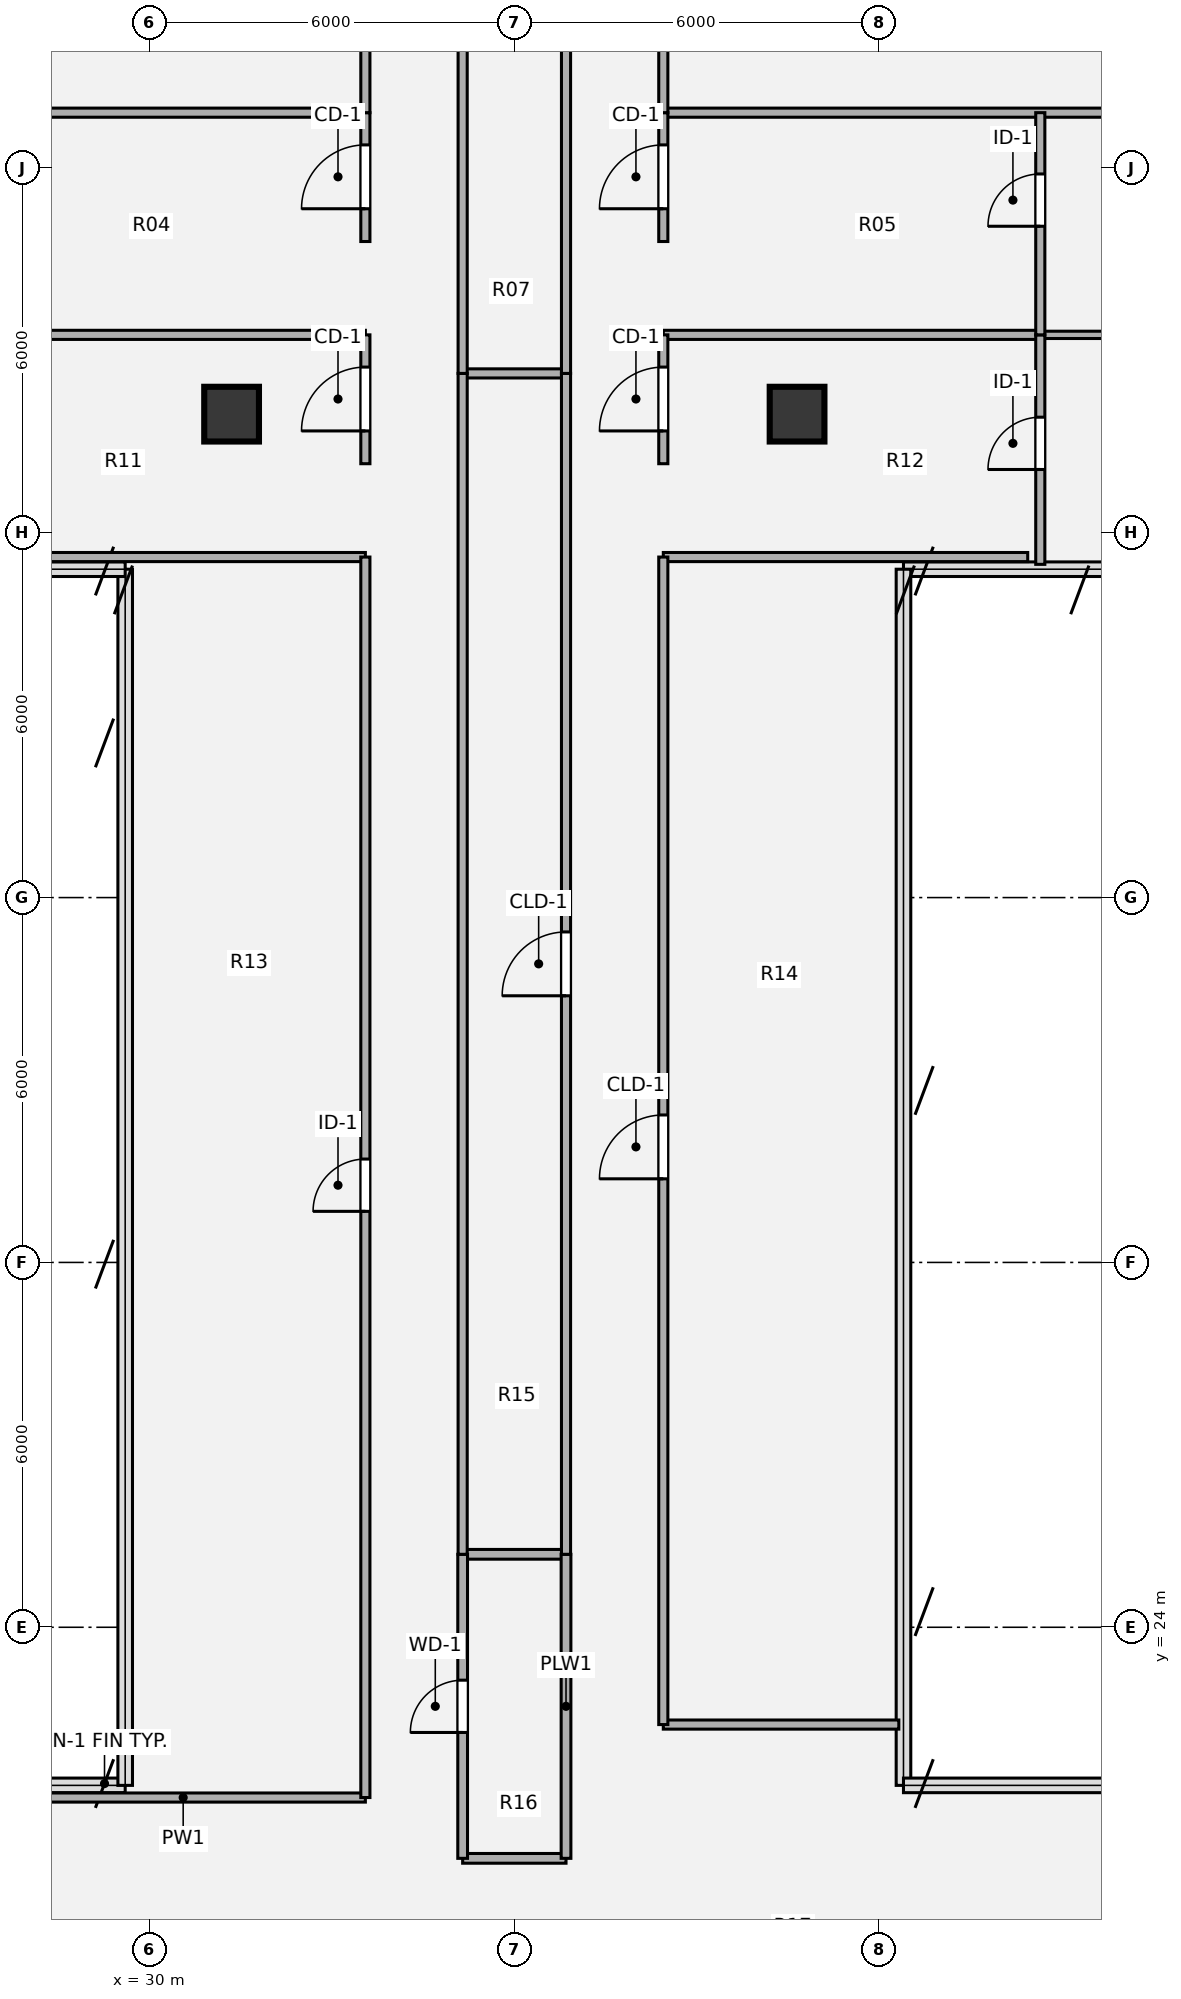
"""IFC4 building model, lengths in metres.
Left out: names, types, materials, properties, quantities, classifications, styles, units other than length and angle.
Written with IfcOpenShell. Run it as: python <this file> out.ifc"""

import sys

from ifc_helpers import new_model, si_unit, direction, frame, frame_2d, origin, origin_2d, place, context, subcontext, project, spatial, rectangle, hollow_circle, extrude, source, transform, mapped, element, fill, save


model = new_model("IFC4")
c1 = context("Model", 3, precision=1e-05, world=origin(), true_north=direction((0.0, 1.0)))
c2 = subcontext(c1, "Body", "Model", "MODEL_VIEW")
j1 = project(units=[si_unit("LENGTHUNIT", "METRE"), si_unit("PLANEANGLEUNIT", "RADIAN")], contexts=[c1])
p1 = place(None, origin())
s1 = spatial("IfcSite", under=j1, at=p1, CompositionType="ELEMENT")
p2 = place(p1, origin())
s2 = spatial("IfcBuilding", under=s1, at=p2, CompositionType="ELEMENT")
p3 = place(p2, frame((0.0, 0.0, 241.92)))
s3 = spatial("IfcBuildingStorey", under=s2, at=p3, CompositionType="ELEMENT", Elevation=241.92)
m1 = source(origin(), c2, "Body", "SweptSolid", [
    extrude(hollow_circle(Radius=0.45, WallThickness=0.032, at=origin_2d()), origin(), (0.0, 0.0, 1.0), 3.78),
])
for number, where, z_axis, x_axis in (
    (1, (31.35, 43.95, 0.0), (0.0, 0.0, 1.0), (1.0, 0.0, 0.0)),
    (2, (40.65, 43.95, 0.0), (0.0, 0.0, 1.0), (1.0, 0.0, 0.0)),
):
    element("IfcColumn", number, at=place(p3, frame(where, z_axis=z_axis, x_axis=x_axis)), inside=s3, PredefinedType="COLUMN", context=c2, shape_type="MappedRepresentation", body=[
        mapped(m1, transform((0.0, 0.0, 0.0), x_axis=(1.0, 0.0, 0.0), y_axis=(0.0, 1.0, 0.0), z_axis=(0.0, 0.0, 1.0), scale=1.0)),
    ])
p4 = place(p3, frame((35.15, 20.2, 0.0), z_axis=(0.0, 0.0, 1.0), x_axis=(1.0, 0.0, 0.0)))
e3 = element("IfcWall", 3, at=p4, inside=s3, PredefinedType="PLUMBINGWALL", context=c2, shape_type="SweptSolid", body=[
    extrude(rectangle(XDim=1.7, YDim=0.16, at=frame_2d((0.85, 0.0))), origin(), (0.0, 0.0, 1.0), 3.5),
])
p5 = place(p3, frame((27.558, 21.2, 0.0), z_axis=(0.0, 0.0, 1.0), x_axis=(1.0, 0.0, 0.0)))
e4 = element("IfcWall", 4, at=p5, inside=s3, PredefinedType="PARTITIONING", context=c2, shape_type="SweptSolid", body=[
    extrude(rectangle(XDim=5.992, YDim=0.15, at=frame_2d((2.996, 0.0))), origin(), (0.0, 0.0, 1.0), 3.5),
])
p6 = place(p3, frame((38.45, 22.4, 0.0), z_axis=(0.0, 0.0, 1.0), x_axis=(1.0, 0.0, 0.0)))
e5 = element("IfcWall", 5, at=p6, inside=s3, PredefinedType="PARTITIONING", context=c2, shape_type="SweptSolid", body=[
    extrude(rectangle(XDim=3.873, YDim=0.15, at=frame_2d((1.937, 0.0))), origin(), (0.0, 0.0, 1.0), 3.5),
])
p7 = place(p3, frame((35.15, 25.2, 0.0), z_axis=(0.0, 0.0, 1.0), x_axis=(1.0, 0.0, 0.0)))
e6 = element("IfcWall", 6, at=p7, inside=s3, PredefinedType="PLUMBINGWALL", context=c2, shape_type="SweptSolid", body=[
    extrude(rectangle(XDim=1.7, YDim=0.16, at=frame_2d((0.85, 0.0))), origin(), (0.0, 0.0, 1.0), 3.5),
])
p8 = place(p3, frame((27.558, 41.6, 0.0), z_axis=(0.0, 0.0, 1.0), x_axis=(1.0, 0.0, 0.0)))
e7 = element("IfcWall", 7, at=p8, inside=s3, PredefinedType="PARTITIONING", context=c2, shape_type="SweptSolid", body=[
    extrude(rectangle(XDim=5.992, YDim=0.15, at=frame_2d((2.996, 0.0))), origin(), (0.0, 0.0, 1.0), 3.5),
])
p9 = place(p3, frame((38.45, 41.6, 0.0), z_axis=(0.0, 0.0, 1.0), x_axis=(1.0, 0.0, 0.0)))
e8 = element("IfcWall", 8, at=p9, inside=s3, PredefinedType="PARTITIONING", context=c2, shape_type="SweptSolid", body=[
    extrude(rectangle(XDim=5.993, YDim=0.15, at=frame_2d((2.997, 0.0))), origin(), (0.0, 0.0, 1.0), 3.5),
])
p10 = place(p3, frame((35.15, 44.62, 0.0), z_axis=(0.0, 0.0, 1.0), x_axis=(1.0, 0.0, 0.0)))
e9 = element("IfcWall", 9, at=p10, inside=s3, PredefinedType="PARTITIONING", context=c2, shape_type="SweptSolid", body=[
    extrude(rectangle(XDim=1.7, YDim=0.15, at=frame_2d((0.85, 0.0))), origin(), (0.0, 0.0, 1.0), 3.259),
])
for number, where, z_axis, x_axis in (
    (10, (27.35, 45.254, 0.0), (0.0, 0.0, 1.0), (1.0, 0.0, 0.0)),
    (11, (38.45, 45.254, 0.0), (0.0, 0.0, 1.0), (1.0, 0.0, 0.0)),
):
    element("IfcWall", number, at=place(p3, frame(where, z_axis=z_axis, x_axis=x_axis)), inside=s3, PredefinedType="PARTITIONING", context=c2, shape_type="SweptSolid", body=[
        extrude(rectangle(XDim=6.2, YDim=0.15, at=frame_2d((3.1, 0.0))), origin(), (0.0, 0.0, 1.0), 2.982),
    ])
p11 = place(p3, frame((44.65, 45.254, 0.0), z_axis=(0.0, 0.0, 1.0), x_axis=(1.0, 0.0, 0.0)))
e12 = element("IfcWall", 12, at=p11, inside=s3, PredefinedType="PARTITIONING", context=c2, shape_type="SweptSolid", body=[
    extrude(rectangle(XDim=9.57, YDim=0.12, at=frame_2d((4.785, 0.0))), origin(), (0.0, 0.0, 1.0), 2.982),
])
for number, where, z_axis, x_axis in (
    (13, (17.78, 48.908, 0.0), (0.0, 0.0, 1.0), (1.0, 0.0, 0.0)),
    (14, (38.45, 48.908, 0.0), (0.0, 0.0, 1.0), (1.0, 0.0, 0.0)),
):
    element("IfcWall", number, at=place(p3, frame(where, z_axis=z_axis, x_axis=x_axis)), inside=s3, PredefinedType="PARTITIONING", context=c2, shape_type="SweptSolid", body=[
        extrude(rectangle(XDim=15.77, YDim=0.15, at=frame_2d((7.885, 0.0))), origin(), (0.0, 0.0, 1.0), 2.982),
    ])
p12 = place(p3, frame((33.55, 21.2, 0.0), z_axis=(0.0, 0.0, 1.0), x_axis=(0.0, 1.0, 0.0)))
e15 = element("IfcWall", 15, at=p12, inside=s3, PredefinedType="PARTITIONING", context=c2, shape_type="SweptSolid", body=[
    extrude(rectangle(XDim=20.4, YDim=0.15, at=frame_2d((10.2, 0.0))), origin(), (0.0, 0.0, 1.0), 3.5),
])
p13 = place(p12, frame((9.64, 0.0, 0.0)))
e16 = element("IfcOpeningElement", 16, at=p13, cuts=e15, PredefinedType="OPENING", context=c2, shape_type="SweptSolid", body=[
    extrude(rectangle(XDim=0.86, YDim=2.1, at=origin_2d()), frame((0.43, 0.085, 1.05), z_axis=(0.0, -1.0, 0.0), x_axis=(1.0, 0.0, 0.0)), (0.0, 0.0, 1.0), 0.17),
])
p14 = place(p3, frame((33.55, 43.135, 0.0), z_axis=(0.0, 0.0, 1.0), x_axis=(0.0, 1.0, 0.0)))
e17 = element("IfcWall", 17, at=p14, inside=s3, PredefinedType="PARTITIONING", context=c2, shape_type="SweptSolid", body=[
    extrude(rectangle(XDim=2.119, YDim=0.15, at=frame_2d((1.06, 0.0))), origin(), (0.0, 0.0, 1.0), 3.5),
])
p15 = place(p14, frame((0.539, 0.0, 0.0)))
e18 = element("IfcOpeningElement", 18, at=p15, cuts=e17, PredefinedType="OPENING", context=c2, shape_type="SweptSolid", body=[
    extrude(rectangle(XDim=1.05, YDim=2.1, at=origin_2d()), frame((0.525, 0.085, 1.05), z_axis=(0.0, -1.0, 0.0), x_axis=(1.0, 0.0, 0.0)), (0.0, 0.0, 1.0), 0.17),
])
p16 = place(p3, frame((33.55, 46.789, 0.0), z_axis=(0.0, 0.0, 1.0), x_axis=(0.0, 1.0, 0.0)))
e19 = element("IfcWall", 19, at=p16, inside=s3, PredefinedType="PARTITIONING", context=c2, shape_type="SweptSolid", body=[
    extrude(rectangle(XDim=2.119, YDim=0.15, at=frame_2d((1.06, 0.0))), origin(), (0.0, 0.0, 1.0), 3.5),
])
p17 = place(p16, frame((0.539, 0.0, 0.0)))
e20 = element("IfcOpeningElement", 20, at=p17, cuts=e19, PredefinedType="OPENING", context=c2, shape_type="SweptSolid", body=[
    extrude(rectangle(XDim=1.05, YDim=2.1, at=origin_2d()), frame((0.525, 0.085, 1.05), z_axis=(0.0, -1.0, 0.0), x_axis=(1.0, 0.0, 0.0)), (0.0, 0.0, 1.0), 0.17),
])
p18 = place(p3, frame((33.55, 48.908, 0.0), z_axis=(0.0, 0.0, 1.0), x_axis=(0.0, 1.0, 0.0)))
e21 = element("IfcWall", 21, at=p18, inside=s3, PredefinedType="PARTITIONING", context=c2, shape_type="SweptSolid", body=[
    extrude(rectangle(XDim=10.092, YDim=0.15, at=frame_2d((5.046, 0.0))), origin(), (0.0, 0.0, 1.0), 3.5),
])
p19 = place(p18, frame((4.521, 0.0, 0.0)))
e22 = element("IfcOpeningElement", 22, at=p19, cuts=e21, PredefinedType="OPENING", context=c2, shape_type="SweptSolid", body=[
    extrude(rectangle(XDim=1.05, YDim=2.1, at=origin_2d()), frame((0.525, 0.085, 1.05), z_axis=(0.0, -1.0, 0.0), x_axis=(1.0, 0.0, 0.0)), (0.0, 0.0, 1.0), 0.17),
])
p20 = place(p3, frame((35.15, 20.2, 0.0), z_axis=(0.0, 0.0, 1.0), x_axis=(0.0, 1.0, 0.0)))
e23 = element("IfcWall", 23, at=p20, inside=s3, PredefinedType="PLUMBINGWALL", context=c2, shape_type="SweptSolid", body=[
    extrude(rectangle(XDim=5.0, YDim=0.16, at=frame_2d((2.5, 0.0))), origin(), (0.0, 0.0, 1.0), 3.5),
])
p21 = place(p20, frame((2.07, 0.0, 0.0)))
e24 = element("IfcOpeningElement", 24, at=p21, cuts=e23, PredefinedType="OPENING", context=c2, shape_type="SweptSolid", body=[
    extrude(rectangle(XDim=0.86, YDim=2.1, at=origin_2d()), frame((0.43, 0.09, 1.05), z_axis=(0.0, -1.0, 0.0), x_axis=(1.0, 0.0, 0.0)), (0.0, 0.0, 1.0), 0.18),
])
p22 = place(p3, frame((35.15, 25.2, 0.0), z_axis=(0.0, 0.0, 1.0), x_axis=(0.0, 1.0, 0.0)))
e25 = element("IfcWall", 25, at=p22, inside=s3, PredefinedType="PARTITIONING", context=c2, shape_type="SweptSolid", body=[
    extrude(rectangle(XDim=19.42, YDim=0.15, at=frame_2d((9.71, 0.0))), origin(), (0.0, 0.0, 1.0), 3.5),
])
p23 = place(p3, frame((35.15, 44.62, 0.0), z_axis=(0.0, 0.0, 1.0), x_axis=(0.0, 1.0, 0.0)))
e26 = element("IfcWall", 26, at=p23, inside=s3, PredefinedType="PARTITIONING", context=c2, shape_type="SweptSolid", body=[
    extrude(rectangle(XDim=12.58, YDim=0.15, at=frame_2d((6.29, 0.0))), origin(), (0.0, 0.0, 1.0), 3.5),
])
p24 = place(p23, frame((5.83, 0.0, 0.0)))
e27 = element("IfcOpeningElement", 27, at=p24, cuts=e26, PredefinedType="OPENING", context=c2, shape_type="SweptSolid", body=[
    extrude(rectangle(XDim=0.86, YDim=2.1, at=origin_2d()), frame((0.43, 0.085, 1.05), z_axis=(0.0, -1.0, 0.0), x_axis=(1.0, 0.0, 0.0)), (0.0, 0.0, 1.0), 0.17),
])
p25 = place(p3, frame((36.85, 20.2, 0.0), z_axis=(0.0, 0.0, 1.0), x_axis=(0.0, 1.0, 0.0)))
e28 = element("IfcWall", 28, at=p25, inside=s3, PredefinedType="PLUMBINGWALL", context=c2, shape_type="SweptSolid", body=[
    extrude(rectangle(XDim=5.0, YDim=0.16, at=frame_2d((2.5, 0.0))), origin(), (0.0, 0.0, 1.0), 3.5),
])
p26 = place(p3, frame((36.85, 25.2, 0.0), z_axis=(0.0, 0.0, 1.0), x_axis=(0.0, 1.0, 0.0)))
e29 = element("IfcWall", 29, at=p26, inside=s3, PredefinedType="PARTITIONING", context=c2, shape_type="SweptSolid", body=[
    extrude(rectangle(XDim=19.42, YDim=0.15, at=frame_2d((9.71, 0.0))), origin(), (0.0, 0.0, 1.0), 3.5),
])
p27 = place(p26, frame((9.185, 0.0, 0.0)))
e30 = element("IfcOpeningElement", 30, at=p27, cuts=e29, PredefinedType="OPENING", context=c2, shape_type="SweptSolid", body=[
    extrude(rectangle(XDim=1.05, YDim=2.1, at=origin_2d()), frame((0.525, 0.085, 1.05), z_axis=(0.0, -1.0, 0.0), x_axis=(1.0, 0.0, 0.0)), (0.0, 0.0, 1.0), 0.17),
])
p28 = place(p3, frame((36.85, 44.62, 0.0), z_axis=(0.0, 0.0, 1.0), x_axis=(0.0, 1.0, 0.0)))
e31 = element("IfcWall", 31, at=p28, inside=s3, PredefinedType="PARTITIONING", context=c2, shape_type="SweptSolid", body=[
    extrude(rectangle(XDim=12.58, YDim=0.15, at=frame_2d((6.29, 0.0))), origin(), (0.0, 0.0, 1.0), 3.5),
])
p29 = place(p3, frame((38.45, 22.4, 0.0), z_axis=(0.0, 0.0, 1.0), x_axis=(0.0, 1.0, 0.0)))
e32 = element("IfcWall", 32, at=p29, inside=s3, PredefinedType="PARTITIONING", context=c2, shape_type="SweptSolid", body=[
    extrude(rectangle(XDim=19.2, YDim=0.15, at=frame_2d((9.6, 0.0))), origin(), (0.0, 0.0, 1.0), 3.5),
])
p30 = place(p29, frame((8.975, 0.0, 0.0)))
e33 = element("IfcOpeningElement", 33, at=p30, cuts=e32, PredefinedType="OPENING", context=c2, shape_type="SweptSolid", body=[
    extrude(rectangle(XDim=1.05, YDim=2.1, at=origin_2d()), frame((0.525, 0.085, 1.05), z_axis=(0.0, -1.0, 0.0), x_axis=(1.0, 0.0, 0.0)), (0.0, 0.0, 1.0), 0.17),
])
p31 = place(p3, frame((38.45, 43.135, 0.0), z_axis=(0.0, 0.0, 1.0), x_axis=(0.0, 1.0, 0.0)))
e34 = element("IfcWall", 34, at=p31, inside=s3, PredefinedType="PARTITIONING", context=c2, shape_type="SweptSolid", body=[
    extrude(rectangle(XDim=2.119, YDim=0.15, at=frame_2d((1.06, 0.0))), origin(), (0.0, 0.0, 1.0), 3.5),
])
p32 = place(p31, frame((0.539, 0.0, 0.0)))
e35 = element("IfcOpeningElement", 35, at=p32, cuts=e34, PredefinedType="OPENING", context=c2, shape_type="SweptSolid", body=[
    extrude(rectangle(XDim=1.05, YDim=2.1, at=origin_2d()), frame((0.525, 0.085, 1.05), z_axis=(0.0, -1.0, 0.0), x_axis=(1.0, 0.0, 0.0)), (0.0, 0.0, 1.0), 0.17),
])
p33 = place(p3, frame((38.45, 46.789, 0.0), z_axis=(0.0, 0.0, 1.0), x_axis=(0.0, 1.0, 0.0)))
e36 = element("IfcWall", 36, at=p33, inside=s3, PredefinedType="PARTITIONING", context=c2, shape_type="SweptSolid", body=[
    extrude(rectangle(XDim=2.119, YDim=0.15, at=frame_2d((1.06, 0.0))), origin(), (0.0, 0.0, 1.0), 3.5),
])
p34 = place(p33, frame((0.539, 0.0, 0.0)))
e37 = element("IfcOpeningElement", 37, at=p34, cuts=e36, PredefinedType="OPENING", context=c2, shape_type="SweptSolid", body=[
    extrude(rectangle(XDim=1.05, YDim=2.1, at=origin_2d()), frame((0.525, 0.085, 1.05), z_axis=(0.0, -1.0, 0.0), x_axis=(1.0, 0.0, 0.0)), (0.0, 0.0, 1.0), 0.17),
])
p35 = place(p3, frame((38.45, 48.908, 0.0), z_axis=(0.0, 0.0, 1.0), x_axis=(0.0, 1.0, 0.0)))
e38 = element("IfcWall", 38, at=p35, inside=s3, PredefinedType="PARTITIONING", context=c2, shape_type="SweptSolid", body=[
    extrude(rectangle(XDim=10.092, YDim=0.15, at=frame_2d((5.046, 0.0))), origin(), (0.0, 0.0, 1.0), 3.5),
])
p36 = place(p35, frame((4.521, 0.0, 0.0)))
e39 = element("IfcOpeningElement", 39, at=p36, cuts=e38, PredefinedType="OPENING", context=c2, shape_type="SweptSolid", body=[
    extrude(rectangle(XDim=1.05, YDim=2.1, at=origin_2d()), frame((0.525, 0.085, 1.05), z_axis=(0.0, -1.0, 0.0), x_axis=(1.0, 0.0, 0.0)), (0.0, 0.0, 1.0), 0.17),
])
p37 = place(p3, frame((44.65, 41.48, 0.0), z_axis=(0.0, 0.0, 1.0), x_axis=(0.0, 1.0, 0.0)))
e40 = element("IfcWall", 40, at=p37, inside=s3, PredefinedType="PARTITIONING", context=c2, shape_type="SweptSolid", body=[
    extrude(rectangle(XDim=3.774, YDim=0.15, at=frame_2d((1.887, 0.0))), origin(), (0.0, 0.0, 1.0), 3.5),
])
p38 = place(p37, frame((1.56, 0.0, 0.0)))
e41 = element("IfcOpeningElement", 41, at=p38, cuts=e40, PredefinedType="OPENING", context=c2, shape_type="SweptSolid", body=[
    extrude(rectangle(XDim=0.86, YDim=2.1, at=origin_2d()), frame((0.43, 0.085, 1.05), z_axis=(0.0, -1.0, 0.0), x_axis=(1.0, 0.0, 0.0)), (0.0, 0.0, 1.0), 0.17),
])
p39 = place(p3, frame((44.65, 45.254, 0.0), z_axis=(0.0, 0.0, 1.0), x_axis=(0.0, 1.0, 0.0)))
e42 = element("IfcWall", 42, at=p39, inside=s3, PredefinedType="PARTITIONING", context=c2, shape_type="SweptSolid", body=[
    extrude(rectangle(XDim=3.654, YDim=0.15, at=frame_2d((1.827, 0.0))), origin(), (0.0, 0.0, 1.0), 3.5),
])
p40 = place(p39, frame((1.786, 0.0, 0.0)))
e43 = element("IfcOpeningElement", 43, at=p40, cuts=e42, PredefinedType="OPENING", context=c2, shape_type="SweptSolid", body=[
    extrude(rectangle(XDim=0.86, YDim=2.1, at=origin_2d()), frame((0.43, 0.085, 1.05), z_axis=(0.0, -1.0, 0.0), x_axis=(1.0, 0.0, 0.0)), (0.0, 0.0, 1.0), 0.17),
])
m2 = source(origin(), c2, "Body", "SweptSolid", [
    extrude(rectangle(XDim=0.86, YDim=2.1, at=origin_2d()), frame((0.43, 0.025, 1.05), z_axis=(0.0, -1.0, 0.0), x_axis=(1.0, 0.0, 0.0)), (0.0, 0.0, 1.0), 0.05),
])
p41 = place(p13, origin())
e44 = element("IfcDoor", 44, at=p41, inside=s3, OperationType="SINGLE_SWING_LEFT", PredefinedType="DOOR", context=c2, shape_type="MappedRepresentation", body=[
    mapped(m2, transform((0.0, 0.0, 0.0), x_axis=(1.0, 0.0, 0.0), y_axis=(0.0, 1.0, 0.0), z_axis=(0.0, 0.0, 1.0), scale=1.0)),
])
fill(e16, e44)
m3 = source(origin(), c2, "Body", "SweptSolid", [
    extrude(rectangle(XDim=1.05, YDim=2.1, at=origin_2d()), frame((0.525, 0.025, 1.05), z_axis=(0.0, -1.0, 0.0), x_axis=(1.0, 0.0, 0.0)), (0.0, 0.0, 1.0), 0.05),
])
p42 = place(p15, origin())
e45 = element("IfcDoor", 45, at=p42, inside=s3, OperationType="SINGLE_SWING_LEFT", PredefinedType="DOOR", context=c2, shape_type="MappedRepresentation", body=[
    mapped(m3, transform((0.0, 0.0, 0.0), x_axis=(1.0, 0.0, 0.0), y_axis=(0.0, 1.0, 0.0), z_axis=(0.0, 0.0, 1.0), scale=1.0)),
])
fill(e18, e45)
p43 = place(p17, origin())
e46 = element("IfcDoor", 46, at=p43, inside=s3, OperationType="SINGLE_SWING_LEFT", PredefinedType="DOOR", context=c2, shape_type="MappedRepresentation", body=[
    mapped(m3, transform((0.0, 0.0, 0.0), x_axis=(1.0, 0.0, 0.0), y_axis=(0.0, 1.0, 0.0), z_axis=(0.0, 0.0, 1.0), scale=1.0)),
])
fill(e20, e46)
m4 = source(origin(), c2, "Body", "SweptSolid", [
    extrude(rectangle(XDim=0.86, YDim=2.1, at=origin_2d()), frame((0.43, 0.025, 1.05), z_axis=(0.0, -1.0, 0.0), x_axis=(1.0, 0.0, 0.0)), (0.0, 0.0, 1.0), 0.05),
])
p44 = place(p21, origin())
e47 = element("IfcDoor", 47, at=p44, inside=s3, OperationType="SINGLE_SWING_LEFT", PredefinedType="DOOR", context=c2, shape_type="MappedRepresentation", body=[
    mapped(m4, transform((0.0, 0.0, 0.0), x_axis=(1.0, 0.0, 0.0), y_axis=(0.0, 1.0, 0.0), z_axis=(0.0, 0.0, 1.0), scale=1.0)),
])
fill(e24, e47)
m5 = source(origin(), c2, "Body", "SweptSolid", [
    extrude(rectangle(XDim=1.05, YDim=2.1, at=origin_2d()), frame((0.525, 0.025, 1.05), z_axis=(0.0, -1.0, 0.0), x_axis=(1.0, 0.0, 0.0)), (0.0, 0.0, 1.0), 0.05),
])
p45 = place(p27, origin())
e48 = element("IfcDoor", 48, at=p45, inside=s3, OperationType="SINGLE_SWING_LEFT", PredefinedType="DOOR", context=c2, shape_type="MappedRepresentation", body=[
    mapped(m5, transform((0.0, 0.0, 0.0), x_axis=(1.0, 0.0, 0.0), y_axis=(0.0, 1.0, 0.0), z_axis=(0.0, 0.0, 1.0), scale=1.0)),
])
fill(e30, e48)
p46 = place(p30, origin())
e49 = element("IfcDoor", 49, at=p46, inside=s3, OperationType="SINGLE_SWING_LEFT", PredefinedType="DOOR", context=c2, shape_type="MappedRepresentation", body=[
    mapped(m5, transform((0.0, 0.0, 0.0), x_axis=(1.0, 0.0, 0.0), y_axis=(0.0, 1.0, 0.0), z_axis=(0.0, 0.0, 1.0), scale=1.0)),
])
fill(e33, e49)
p47 = place(p32, origin())
e50 = element("IfcDoor", 50, at=p47, inside=s3, OperationType="SINGLE_SWING_LEFT", PredefinedType="DOOR", context=c2, shape_type="MappedRepresentation", body=[
    mapped(m3, transform((0.0, 0.0, 0.0), x_axis=(1.0, 0.0, 0.0), y_axis=(0.0, 1.0, 0.0), z_axis=(0.0, 0.0, 1.0), scale=1.0)),
])
fill(e35, e50)
p48 = place(p34, origin())
e51 = element("IfcDoor", 51, at=p48, inside=s3, OperationType="SINGLE_SWING_LEFT", PredefinedType="DOOR", context=c2, shape_type="MappedRepresentation", body=[
    mapped(m3, transform((0.0, 0.0, 0.0), x_axis=(1.0, 0.0, 0.0), y_axis=(0.0, 1.0, 0.0), z_axis=(0.0, 0.0, 1.0), scale=1.0)),
])
fill(e37, e51)
p49 = place(p38, origin())
e52 = element("IfcDoor", 52, at=p49, inside=s3, OperationType="SINGLE_SWING_LEFT", PredefinedType="DOOR", context=c2, shape_type="MappedRepresentation", body=[
    mapped(m2, transform((0.0, 0.0, 0.0), x_axis=(1.0, 0.0, 0.0), y_axis=(0.0, 1.0, 0.0), z_axis=(0.0, 0.0, 1.0), scale=1.0)),
])
fill(e41, e52)
p50 = place(p40, origin())
e53 = element("IfcDoor", 53, at=p50, inside=s3, OperationType="SINGLE_SWING_LEFT", PredefinedType="DOOR", context=c2, shape_type="MappedRepresentation", body=[
    mapped(m2, transform((0.0, 0.0, 0.0), x_axis=(1.0, 0.0, 0.0), y_axis=(0.0, 1.0, 0.0), z_axis=(0.0, 0.0, 1.0), scale=1.0)),
])
fill(e43, e53)
save(model, sys.argv[1])
